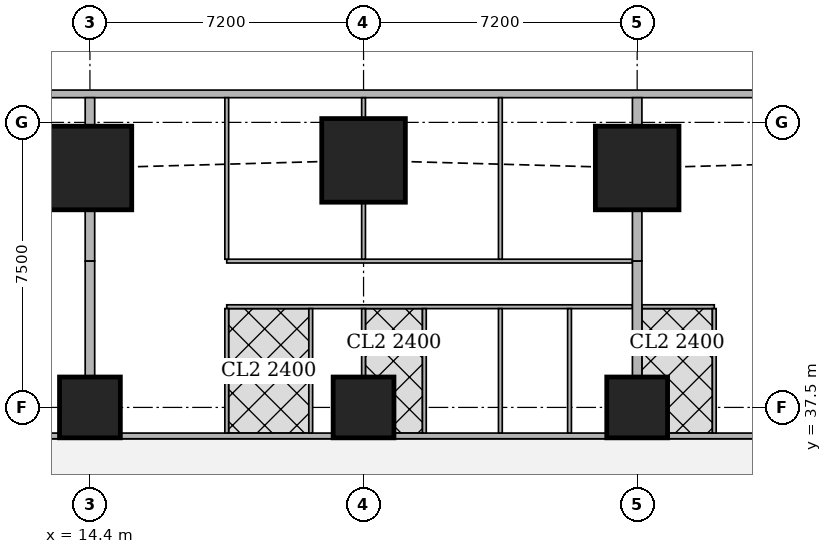
"""IFC4 building model, lengths in metres.
Left out: names, types, materials, properties, quantities, classifications, styles, units other than length and angle.
Written with IfcOpenShell. Run it as: python <this file> out.ifc"""

import sys

from ifc_helpers import new_model, si_unit, direction, frame, frame_2d, origin, origin_2d, place, context, subcontext, project, spatial, rectangle, extrude, element, fill, save


model = new_model("IFC4")
c1 = context("Model", 3, precision=1e-05, world=origin(), true_north=direction((0.0, 1.0)))
c2 = subcontext(c1, "Body", "Model", "MODEL_VIEW")
j1 = project(units=[si_unit("LENGTHUNIT", "METRE"), si_unit("PLANEANGLEUNIT", "RADIAN")], contexts=[c1])
p1 = place(None, origin())
s1 = spatial("IfcSite", under=j1, at=p1, CompositionType="ELEMENT")
p2 = place(p1, origin())
s2 = spatial("IfcBuilding", under=s1, at=p2, CompositionType="ELEMENT")
p3 = place(p2, frame((0.0, 0.0, 81.65)))
s3 = spatial("IfcBuildingStorey", under=s2, at=p3, CompositionType="ELEMENT", Elevation=81.65)
for number, where, z_axis, x_axis in (
    (1, (14.4, 37.5, 0.0), (0.0, 0.0, 1.0), (1.0, 0.0, 0.0)),
    (2, (21.6, 37.5, 0.0), (0.0, 0.0, 1.0), (1.0, 0.0, 0.0)),
    (3, (28.8, 37.5, 0.0), (0.0, 0.0, 1.0), (1.0, 0.0, 0.0)),
):
    element("IfcColumn", number, at=place(p3, frame(where, z_axis=z_axis, x_axis=x_axis)), inside=s3, PredefinedType="COLUMN", context=c2, shape_type="SweptSolid", body=[
        extrude(rectangle(XDim=1.6, YDim=1.6, at=origin_2d()), origin(), (0.0, 0.0, 1.0), 3.75),
    ])
for number, where, z_axis, x_axis in (
    (4, (14.4, 43.8, 0.0), (0.0, 0.0, 1.0), (1.0, 0.0, 0.0)),
    (5, (21.6, 44.0, 0.0), (0.0, 0.0, 1.0), (1.0, 0.0, 0.0)),
    (6, (28.8, 43.8, 0.0), (0.0, 0.0, 1.0), (1.0, 0.0, 0.0)),
):
    element("IfcColumn", number, at=place(p3, frame(where, z_axis=z_axis, x_axis=x_axis)), inside=s3, PredefinedType="COLUMN", context=c2, shape_type="SweptSolid", body=[
        extrude(rectangle(XDim=2.2, YDim=2.2, at=origin_2d()), origin(), (0.0, 0.0, 1.0), 3.75),
    ])
p4 = place(p3, frame((40.106, 45.75, 0.0), z_axis=(0.0, 0.0, 1.0), x_axis=(-1.0, 0.0, 0.0)))
e7 = element("IfcWall", 7, at=p4, inside=s3, PredefinedType="SOLIDWALL", context=c2, shape_type="SweptSolid", body=[
    extrude(rectangle(XDim=37.943, YDim=0.2, at=frame_2d((18.971, 0.0))), origin(), (0.0, 0.0, 1.0), 3.5),
])
p5 = place(p4, frame((8.606, 0.0, 0.9)))
e8 = element("IfcOpeningElement", 8, at=p5, cuts=e7, PredefinedType="OPENING", context=c2, shape_type="SweptSolid", body=[
    extrude(rectangle(XDim=1.8, YDim=1.5, at=frame_2d((0.9, 0.75))), frame((0.0, 0.11, 0.0), z_axis=(0.0, -1.0, 0.0), x_axis=(1.0, 0.0, 0.0)), (0.0, 0.0, 1.0), 0.22),
])
p6 = place(p4, frame((12.206, 0.0, 0.9)))
e9 = element("IfcOpeningElement", 9, at=p6, cuts=e7, PredefinedType="OPENING", context=c2, shape_type="SweptSolid", body=[
    extrude(rectangle(XDim=1.8, YDim=1.5, at=frame_2d((0.9, 0.75))), frame((0.0, 0.11, 0.0), z_axis=(0.0, -1.0, 0.0), x_axis=(1.0, 0.0, 0.0)), (0.0, 0.0, 1.0), 0.22),
])
p7 = place(p4, frame((15.806, 0.0, 0.9)))
e10 = element("IfcOpeningElement", 10, at=p7, cuts=e7, PredefinedType="OPENING", context=c2, shape_type="SweptSolid", body=[
    extrude(rectangle(XDim=1.8, YDim=1.5, at=frame_2d((0.9, 0.75))), frame((0.0, 0.11, 0.0), z_axis=(0.0, -1.0, 0.0), x_axis=(1.0, 0.0, 0.0)), (0.0, 0.0, 1.0), 0.22),
])
p8 = place(p4, frame((19.406, 0.0, 0.9)))
e11 = element("IfcOpeningElement", 11, at=p8, cuts=e7, PredefinedType="OPENING", context=c2, shape_type="SweptSolid", body=[
    extrude(rectangle(XDim=1.8, YDim=1.5, at=frame_2d((0.9, 0.75))), frame((0.0, 0.11, 0.0), z_axis=(0.0, -1.0, 0.0), x_axis=(1.0, 0.0, 0.0)), (0.0, 0.0, 1.0), 0.22),
])
p9 = place(p4, frame((23.006, 0.0, 0.9)))
e12 = element("IfcOpeningElement", 12, at=p9, cuts=e7, PredefinedType="OPENING", context=c2, shape_type="SweptSolid", body=[
    extrude(rectangle(XDim=1.8, YDim=1.5, at=frame_2d((0.9, 0.75))), frame((0.0, 0.11, 0.0), z_axis=(0.0, -1.0, 0.0), x_axis=(1.0, 0.0, 0.0)), (0.0, 0.0, 1.0), 0.22),
])
p10 = place(p4, frame((26.606, 0.0, 0.9)))
e13 = element("IfcOpeningElement", 13, at=p10, cuts=e7, PredefinedType="OPENING", context=c2, shape_type="SweptSolid", body=[
    extrude(rectangle(XDim=1.8, YDim=1.5, at=frame_2d((0.9, 0.75))), frame((0.0, 0.11, 0.0), z_axis=(0.0, -1.0, 0.0), x_axis=(1.0, 0.0, 0.0)), (0.0, 0.0, 1.0), 0.22),
])
p11 = place(p3, frame((8.1, 36.75, 0.0), z_axis=(0.0, 0.0, 1.0), x_axis=(1.0, 0.0, 0.0)))
e14 = element("IfcWall", 14, at=p11, inside=s3, PredefinedType="SOLIDWALL", context=c2, shape_type="SweptSolid", body=[
    extrude(rectangle(XDim=5.499, YDim=0.15, at=frame_2d((2.75, 0.0))), origin(), (0.0, 0.0, 1.0), 3.5),
])
p12 = place(p11, frame((3.739, 0.0, 0.0)))
e15 = element("IfcOpeningElement", 15, at=p12, cuts=e14, PredefinedType="OPENING", context=c2, shape_type="SweptSolid", body=[
    extrude(rectangle(XDim=1.0, YDim=2.1, at=frame_2d((0.5, 1.05))), frame((0.0, 0.085, 0.0), z_axis=(0.0, -1.0, 0.0), x_axis=(1.0, 0.0, 0.0)), (0.0, 0.0, 1.0), 0.17),
])
p13 = place(p3, frame((15.201, 36.75, 0.0), z_axis=(0.0, 0.0, 1.0), x_axis=(1.0, 0.0, 0.0)))
e16 = element("IfcWall", 16, at=p13, inside=s3, PredefinedType="SOLIDWALL", context=c2, shape_type="SweptSolid", body=[
    extrude(rectangle(XDim=5.598, YDim=0.15, at=frame_2d((2.799, 0.0))), origin(), (0.0, 0.0, 1.0), 3.5),
])
p14 = place(p13, frame((0.699, 0.0, 0.0)))
e17 = element("IfcOpeningElement", 17, at=p14, cuts=e16, PredefinedType="OPENING", context=c2, shape_type="SweptSolid", body=[
    extrude(rectangle(XDim=1.0, YDim=2.1, at=frame_2d((0.5, 1.05))), frame((0.0, 0.085, 0.0), z_axis=(0.0, -1.0, 0.0), x_axis=(1.0, 0.0, 0.0)), (0.0, 0.0, 1.0), 0.17),
])
p15 = place(p3, frame((22.401, 36.75, 0.0), z_axis=(0.0, 0.0, 1.0), x_axis=(1.0, 0.0, 0.0)))
e18 = element("IfcWall", 18, at=p15, inside=s3, PredefinedType="SOLIDWALL", context=c2, shape_type="SweptSolid", body=[
    extrude(rectangle(XDim=5.598, YDim=0.15, at=frame_2d((2.799, 0.0))), origin(), (0.0, 0.0, 1.0), 3.5),
])
p16 = place(p3, frame((29.601, 36.75, 0.0), z_axis=(0.0, 0.0, 1.0), x_axis=(1.0, 0.0, 0.0)))
e19 = element("IfcWall", 19, at=p16, inside=s3, PredefinedType="SOLIDWALL", context=c2, shape_type="SweptSolid", body=[
    extrude(rectangle(XDim=5.372, YDim=0.15, at=frame_2d((2.686, 0.0))), origin(), (0.0, 0.0, 1.0), 3.5),
])
p17 = place(p16, frame((2.845, 0.0, 0.0)))
e20 = element("IfcOpeningElement", 20, at=p17, cuts=e19, PredefinedType="OPENING", context=c2, shape_type="SweptSolid", body=[
    extrude(rectangle(XDim=1.0, YDim=2.1, at=frame_2d((0.5, 1.05))), frame((0.0, 0.085, 0.0), z_axis=(0.0, -1.0, 0.0), x_axis=(1.0, 0.0, 0.0)), (0.0, 0.0, 1.0), 0.17),
])
p18 = place(p3, frame((18.0, 41.35, 0.0), z_axis=(0.0, 0.0, 1.0), x_axis=(1.0, 0.0, 0.0)))
e21 = element("IfcWall", 21, at=p18, inside=s3, PredefinedType="PARTITIONING", context=c2, shape_type="SweptSolid", body=[
    extrude(rectangle(XDim=10.675, YDim=0.1, at=frame_2d((5.337, 0.0))), origin(), (0.0, 0.0, 1.0), 3.5),
])
p19 = place(p18, frame((0.2, 0.0, 0.0)))
e22 = element("IfcOpeningElement", 22, at=p19, cuts=e21, PredefinedType="OPENING", context=c2, shape_type="SweptSolid", body=[
    extrude(rectangle(XDim=0.9, YDim=2.1, at=frame_2d((0.45, 1.05))), frame((0.0, 0.06, 0.0), z_axis=(0.0, -1.0, 0.0), x_axis=(1.0, 0.0, 0.0)), (0.0, 0.0, 1.0), 0.12),
])
p20 = place(p18, frame((3.8, 0.0, 0.0)))
e23 = element("IfcOpeningElement", 23, at=p20, cuts=e21, PredefinedType="OPENING", context=c2, shape_type="SweptSolid", body=[
    extrude(rectangle(XDim=0.9, YDim=2.1, at=frame_2d((0.45, 1.05))), frame((0.0, 0.06, 0.0), z_axis=(0.0, -1.0, 0.0), x_axis=(1.0, 0.0, 0.0)), (0.0, 0.0, 1.0), 0.12),
])
p21 = place(p18, frame((7.4, 0.0, 0.0)))
e24 = element("IfcOpeningElement", 24, at=p21, cuts=e21, PredefinedType="OPENING", context=c2, shape_type="SweptSolid", body=[
    extrude(rectangle(XDim=0.9, YDim=2.1, at=frame_2d((0.45, 1.05))), frame((0.0, 0.06, 0.0), z_axis=(0.0, -1.0, 0.0), x_axis=(1.0, 0.0, 0.0)), (0.0, 0.0, 1.0), 0.12),
])
p22 = place(p3, frame((18.0, 40.15, 0.0), z_axis=(0.0, 0.0, 1.0), x_axis=(1.0, 0.0, 0.0)))
e25 = element("IfcWall", 25, at=p22, inside=s3, PredefinedType="PARTITIONING", context=c2, shape_type="SweptSolid", body=[
    extrude(rectangle(XDim=10.675, YDim=0.1, at=frame_2d((5.337, 0.0))), origin(), (0.0, 0.0, 1.0), 3.5),
])
p23 = place(p22, frame((0.655, 0.0, 0.0)))
e26 = element("IfcOpeningElement", 26, at=p23, cuts=e25, PredefinedType="OPENING", context=c2, shape_type="SweptSolid", body=[
    extrude(rectangle(XDim=0.9, YDim=2.1, at=frame_2d((0.45, 1.05))), frame((0.0, 0.06, 0.0), z_axis=(0.0, -1.0, 0.0), x_axis=(1.0, 0.0, 0.0)), (0.0, 0.0, 1.0), 0.12),
])
p24 = place(p22, frame((3.95, 0.0, 0.0)))
e27 = element("IfcOpeningElement", 27, at=p24, cuts=e25, PredefinedType="OPENING", context=c2, shape_type="SweptSolid", body=[
    extrude(rectangle(XDim=0.9, YDim=2.1, at=frame_2d((0.45, 1.05))), frame((0.0, 0.06, 0.0), z_axis=(0.0, -1.0, 0.0), x_axis=(1.0, 0.0, 0.0)), (0.0, 0.0, 1.0), 0.12),
])
p25 = place(p22, frame((7.66, 0.0, 0.0)))
e28 = element("IfcOpeningElement", 28, at=p25, cuts=e25, PredefinedType="OPENING", context=c2, shape_type="SweptSolid", body=[
    extrude(rectangle(XDim=0.9, YDim=2.1, at=frame_2d((0.45, 1.05))), frame((0.0, 0.06, 0.0), z_axis=(0.0, -1.0, 0.0), x_axis=(1.0, 0.0, 0.0)), (0.0, 0.0, 1.0), 0.12),
])
p26 = place(p22, frame((2.455, 0.0, 0.0)))
e29 = element("IfcOpeningElement", 29, at=p26, cuts=e25, PredefinedType="OPENING", context=c2, shape_type="SweptSolid", body=[
    extrude(rectangle(XDim=0.9, YDim=2.1, at=frame_2d((0.45, 1.05))), frame((0.0, 0.06, 0.0), z_axis=(0.0, -1.0, 0.0), x_axis=(1.0, 0.0, 0.0)), (0.0, 0.0, 1.0), 0.12),
])
p27 = place(p22, frame((5.75, 0.0, 0.0)))
e30 = element("IfcOpeningElement", 30, at=p27, cuts=e25, PredefinedType="OPENING", context=c2, shape_type="SweptSolid", body=[
    extrude(rectangle(XDim=0.9, YDim=2.1, at=frame_2d((0.45, 1.05))), frame((0.0, 0.06, 0.0), z_axis=(0.0, -1.0, 0.0), x_axis=(1.0, 0.0, 0.0)), (0.0, 0.0, 1.0), 0.12),
])
p28 = place(p22, frame((9.46, 0.0, 0.0)))
e31 = element("IfcOpeningElement", 31, at=p28, cuts=e25, PredefinedType="OPENING", context=c2, shape_type="SweptSolid", body=[
    extrude(rectangle(XDim=0.9, YDim=2.1, at=frame_2d((0.45, 1.05))), frame((0.0, 0.06, 0.0), z_axis=(0.0, -1.0, 0.0), x_axis=(1.0, 0.0, 0.0)), (0.0, 0.0, 1.0), 0.12),
])
p29 = place(p3, frame((18.0, 41.4, 0.0), z_axis=(0.0, 0.0, 1.0), x_axis=(0.0, 1.0, 0.0)))
e32 = element("IfcWall", 32, at=p29, inside=s3, PredefinedType="PARTITIONING", context=c2, shape_type="SweptSolid", body=[
    extrude(rectangle(XDim=4.25, YDim=0.1, at=frame_2d((2.125, 0.0))), origin(), (0.0, 0.0, 1.0), 2.2),
])
p30 = place(p3, frame((21.6, 41.4, 0.0), z_axis=(0.0, 0.0, 1.0), x_axis=(0.0, 1.0, 0.0)))
e33 = element("IfcWall", 33, at=p30, inside=s3, PredefinedType="PARTITIONING", context=c2, shape_type="SweptSolid", body=[
    extrude(rectangle(XDim=1.499, YDim=0.1, at=frame_2d((0.75, 0.0))), origin(), (0.0, 0.0, 1.0), 3.5),
])
p31 = place(p3, frame((21.6, 45.101, 0.0), z_axis=(0.0, 0.0, 1.0), x_axis=(0.0, 1.0, 0.0)))
e34 = element("IfcWall", 34, at=p31, inside=s3, PredefinedType="PARTITIONING", context=c2, shape_type="SweptSolid", body=[
    extrude(rectangle(XDim=0.549, YDim=0.1, at=frame_2d((0.274, 0.0))), origin(), (0.0, 0.0, 1.0), 3.5),
])
p32 = place(p3, frame((25.2, 41.4, 0.0), z_axis=(0.0, 0.0, 1.0), x_axis=(0.0, 1.0, 0.0)))
e35 = element("IfcWall", 35, at=p32, inside=s3, PredefinedType="PARTITIONING", context=c2, shape_type="SweptSolid", body=[
    extrude(rectangle(XDim=4.25, YDim=0.1, at=frame_2d((2.125, 0.0))), origin(), (0.0, 0.0, 1.0), 2.2),
])
p33 = place(p3, frame((18.0, 36.825, 0.0), z_axis=(0.0, 0.0, 1.0), x_axis=(0.0, 1.0, 0.0)))
e36 = element("IfcWall", 36, at=p33, inside=s3, PredefinedType="PARTITIONING", context=c2, shape_type="SweptSolid", body=[
    extrude(rectangle(XDim=3.275, YDim=0.1, at=frame_2d((1.638, 0.0))), origin(), (0.0, 0.0, 1.0), 3.5),
])
p34 = place(p3, frame((21.6, 38.301, 0.0), z_axis=(0.0, 0.0, 1.0), x_axis=(0.0, 1.0, 0.0)))
e37 = element("IfcWall", 37, at=p34, inside=s3, PredefinedType="PARTITIONING", context=c2, shape_type="SweptSolid", body=[
    extrude(rectangle(XDim=1.799, YDim=0.1, at=frame_2d((0.899, 0.0))), origin(), (0.0, 0.0, 1.0), 3.5),
])
for number, where, z_axis, x_axis in (
    (38, (25.2, 36.825, 0.0), (0.0, 0.0, 1.0), (0.0, 1.0, 0.0)),
    (39, (20.21, 36.825, 0.0), (0.0, 0.0, 1.0), (0.0, 1.0, 0.0)),
    (40, (23.2, 36.825, 0.0), (0.0, 0.0, 1.0), (0.0, 1.0, 0.0)),
    (41, (27.02, 36.825, 0.0), (0.0, 0.0, 1.0), (0.0, 1.0, 0.0)),
):
    element("IfcWall", number, at=place(p3, frame(where, z_axis=z_axis, x_axis=x_axis)), inside=s3, PredefinedType="PARTITIONING", context=c2, shape_type="SweptSolid", body=[
        extrude(rectangle(XDim=3.275, YDim=0.1, at=frame_2d((1.638, 0.0))), origin(), (0.0, 0.0, 1.0), 3.5),
    ])
p35 = place(p3, frame((14.4, 41.35, 0.0), z_axis=(0.0, 0.0, 1.0), x_axis=(0.0, 1.0, 0.0)))
e42 = element("IfcWall", 42, at=p35, inside=s3, PredefinedType="SOLIDWALL", context=c2, shape_type="SweptSolid", body=[
    extrude(rectangle(XDim=1.349, YDim=0.25, at=frame_2d((0.674, 0.0))), origin(), (0.0, 0.0, 1.0), 3.5),
])
p36 = place(p3, frame((14.4, 44.901, 0.0), z_axis=(0.0, 0.0, 1.0), x_axis=(0.0, 1.0, 0.0)))
e43 = element("IfcWall", 43, at=p36, inside=s3, PredefinedType="SOLIDWALL", context=c2, shape_type="SweptSolid", body=[
    extrude(rectangle(XDim=0.749, YDim=0.25, at=frame_2d((0.375, 0.0))), origin(), (0.0, 0.0, 1.0), 3.5),
])
p37 = place(p3, frame((14.4, 38.301, 0.0), z_axis=(0.0, 0.0, 1.0), x_axis=(0.0, 1.0, 0.0)))
e44 = element("IfcWall", 44, at=p37, inside=s3, PredefinedType="SOLIDWALL", context=c2, shape_type="SweptSolid", body=[
    extrude(rectangle(XDim=3.049, YDim=0.25, at=frame_2d((1.524, 0.0))), origin(), (0.0, 0.0, 1.0), 3.5),
])
p38 = place(p3, frame((28.925, 40.15, 0.0), z_axis=(0.0, 0.0, 1.0), x_axis=(1.0, 0.0, 0.0)))
e45 = element("IfcWall", 45, at=p38, inside=s3, PredefinedType="PARTITIONING", context=c2, shape_type="SweptSolid", body=[
    extrude(rectangle(XDim=1.904, YDim=0.1, at=frame_2d((0.952, 0.0))), origin(), (0.0, 0.0, 1.0), 3.5),
])
p39 = place(p38, frame((0.425, 0.0, 0.0)))
e46 = element("IfcOpeningElement", 46, at=p39, cuts=e45, PredefinedType="OPENING", context=c2, shape_type="SweptSolid", body=[
    extrude(rectangle(XDim=0.9, YDim=2.1, at=frame_2d((0.45, 1.05))), frame((0.0, 0.06, 0.0), z_axis=(0.0, -1.0, 0.0), x_axis=(1.0, 0.0, 0.0)), (0.0, 0.0, 1.0), 0.12),
])
p40 = place(p3, frame((30.829, 36.825, 0.0), z_axis=(0.0, 0.0, 1.0), x_axis=(0.0, 1.0, 0.0)))
e47 = element("IfcWall", 47, at=p40, inside=s3, PredefinedType="PARTITIONING", context=c2, shape_type="SweptSolid", body=[
    extrude(rectangle(XDim=3.275, YDim=0.1, at=frame_2d((1.638, 0.0))), origin(), (0.0, 0.0, 1.0), 3.5),
])
p41 = place(p3, frame((28.8, 41.35, 0.0), z_axis=(0.0, 0.0, 1.0), x_axis=(0.0, 1.0, 0.0)))
e48 = element("IfcWall", 48, at=p41, inside=s3, PredefinedType="SOLIDWALL", context=c2, shape_type="SweptSolid", body=[
    extrude(rectangle(XDim=1.349, YDim=0.25, at=frame_2d((0.674, 0.0))), origin(), (0.0, 0.0, 1.0), 3.5),
])
p42 = place(p3, frame((28.8, 44.901, 0.0), z_axis=(0.0, 0.0, 1.0), x_axis=(0.0, 1.0, 0.0)))
e49 = element("IfcWall", 49, at=p42, inside=s3, PredefinedType="SOLIDWALL", context=c2, shape_type="SweptSolid", body=[
    extrude(rectangle(XDim=0.749, YDim=0.25, at=frame_2d((0.375, 0.0))), origin(), (0.0, 0.0, 1.0), 3.5),
])
p43 = place(p3, frame((28.8, 38.301, 0.0), z_axis=(0.0, 0.0, 1.0), x_axis=(0.0, 1.0, 0.0)))
e50 = element("IfcWall", 50, at=p43, inside=s3, PredefinedType="SOLIDWALL", context=c2, shape_type="SweptSolid", body=[
    extrude(rectangle(XDim=3.049, YDim=0.25, at=frame_2d((1.524, 0.0))), origin(), (0.0, 0.0, 1.0), 3.5),
])
p44 = place(p5, origin())
e51 = element("IfcWindow", 51, at=p44, inside=s3, PartitioningType="SINGLE_PANEL", PredefinedType="WINDOW", context=c2, shape_type="SweptSolid", body=[
    extrude(rectangle(XDim=1.8, YDim=1.5, at=frame_2d((0.9, 0.75))), frame((0.0, 0.03, 0.0), z_axis=(0.0, -1.0, 0.0), x_axis=(1.0, 0.0, 0.0)), (0.0, 0.0, 1.0), 0.06),
])
fill(e8, e51)
p45 = place(p6, origin())
e52 = element("IfcWindow", 52, at=p45, inside=s3, PartitioningType="SINGLE_PANEL", PredefinedType="WINDOW", context=c2, shape_type="SweptSolid", body=[
    extrude(rectangle(XDim=1.8, YDim=1.5, at=frame_2d((0.9, 0.75))), frame((0.0, 0.03, 0.0), z_axis=(0.0, -1.0, 0.0), x_axis=(1.0, 0.0, 0.0)), (0.0, 0.0, 1.0), 0.06),
])
fill(e9, e52)
p46 = place(p7, origin())
e53 = element("IfcWindow", 53, at=p46, inside=s3, PartitioningType="SINGLE_PANEL", PredefinedType="WINDOW", context=c2, shape_type="SweptSolid", body=[
    extrude(rectangle(XDim=1.8, YDim=1.5, at=frame_2d((0.9, 0.75))), frame((0.0, 0.03, 0.0), z_axis=(0.0, -1.0, 0.0), x_axis=(1.0, 0.0, 0.0)), (0.0, 0.0, 1.0), 0.06),
])
fill(e10, e53)
p47 = place(p8, origin())
e54 = element("IfcWindow", 54, at=p47, inside=s3, PartitioningType="SINGLE_PANEL", PredefinedType="WINDOW", context=c2, shape_type="SweptSolid", body=[
    extrude(rectangle(XDim=1.8, YDim=1.5, at=frame_2d((0.9, 0.75))), frame((0.0, 0.03, 0.0), z_axis=(0.0, -1.0, 0.0), x_axis=(1.0, 0.0, 0.0)), (0.0, 0.0, 1.0), 0.06),
])
fill(e11, e54)
p48 = place(p9, origin())
e55 = element("IfcWindow", 55, at=p48, inside=s3, PartitioningType="SINGLE_PANEL", PredefinedType="WINDOW", context=c2, shape_type="SweptSolid", body=[
    extrude(rectangle(XDim=1.8, YDim=1.5, at=frame_2d((0.9, 0.75))), frame((0.0, 0.03, 0.0), z_axis=(0.0, -1.0, 0.0), x_axis=(1.0, 0.0, 0.0)), (0.0, 0.0, 1.0), 0.06),
])
fill(e12, e55)
p49 = place(p10, origin())
e56 = element("IfcWindow", 56, at=p49, inside=s3, PartitioningType="SINGLE_PANEL", PredefinedType="WINDOW", context=c2, shape_type="SweptSolid", body=[
    extrude(rectangle(XDim=1.8, YDim=1.5, at=frame_2d((0.9, 0.75))), frame((0.0, 0.03, 0.0), z_axis=(0.0, -1.0, 0.0), x_axis=(1.0, 0.0, 0.0)), (0.0, 0.0, 1.0), 0.06),
])
fill(e13, e56)
p50 = place(p19, origin())
e57 = element("IfcDoor", 57, at=p50, inside=s3, OperationType="SINGLE_SWING_LEFT", PredefinedType="DOOR", context=c2, shape_type="SweptSolid", body=[
    extrude(rectangle(XDim=0.9, YDim=2.1, at=frame_2d((0.45, 1.05))), frame((0.0, 0.025, 0.0), z_axis=(0.0, -1.0, 0.0), x_axis=(1.0, 0.0, 0.0)), (0.0, 0.0, 1.0), 0.05),
])
fill(e22, e57)
p51 = place(p20, origin())
e58 = element("IfcDoor", 58, at=p51, inside=s3, OperationType="SINGLE_SWING_LEFT", PredefinedType="DOOR", context=c2, shape_type="SweptSolid", body=[
    extrude(rectangle(XDim=0.9, YDim=2.1, at=frame_2d((0.45, 1.05))), frame((0.0, 0.025, 0.0), z_axis=(0.0, -1.0, 0.0), x_axis=(1.0, 0.0, 0.0)), (0.0, 0.0, 1.0), 0.05),
])
fill(e23, e58)
p52 = place(p21, origin())
e59 = element("IfcDoor", 59, at=p52, inside=s3, OperationType="SINGLE_SWING_LEFT", PredefinedType="DOOR", context=c2, shape_type="SweptSolid", body=[
    extrude(rectangle(XDim=0.9, YDim=2.1, at=frame_2d((0.45, 1.05))), frame((0.0, 0.025, 0.0), z_axis=(0.0, -1.0, 0.0), x_axis=(1.0, 0.0, 0.0)), (0.0, 0.0, 1.0), 0.05),
])
fill(e24, e59)
p53 = place(p23, origin())
e60 = element("IfcDoor", 60, at=p53, inside=s3, OperationType="SINGLE_SWING_RIGHT", PredefinedType="DOOR", context=c2, shape_type="SweptSolid", body=[
    extrude(rectangle(XDim=0.9, YDim=2.1, at=frame_2d((0.45, 1.05))), frame((0.0, 0.025, 0.0), z_axis=(0.0, -1.0, 0.0), x_axis=(1.0, 0.0, 0.0)), (0.0, 0.0, 1.0), 0.05),
])
fill(e26, e60)
p54 = place(p24, origin())
e61 = element("IfcDoor", 61, at=p54, inside=s3, OperationType="SINGLE_SWING_RIGHT", PredefinedType="DOOR", context=c2, shape_type="SweptSolid", body=[
    extrude(rectangle(XDim=0.9, YDim=2.1, at=frame_2d((0.45, 1.05))), frame((0.0, 0.025, 0.0), z_axis=(0.0, -1.0, 0.0), x_axis=(1.0, 0.0, 0.0)), (0.0, 0.0, 1.0), 0.05),
])
fill(e27, e61)
p55 = place(p25, origin())
e62 = element("IfcDoor", 62, at=p55, inside=s3, OperationType="SINGLE_SWING_RIGHT", PredefinedType="DOOR", context=c2, shape_type="SweptSolid", body=[
    extrude(rectangle(XDim=0.9, YDim=2.1, at=frame_2d((0.45, 1.05))), frame((0.0, 0.025, 0.0), z_axis=(0.0, -1.0, 0.0), x_axis=(1.0, 0.0, 0.0)), (0.0, 0.0, 1.0), 0.05),
])
fill(e28, e62)
p56 = place(p26, origin())
e63 = element("IfcDoor", 63, at=p56, inside=s3, OperationType="SINGLE_SWING_LEFT", PredefinedType="DOOR", context=c2, shape_type="SweptSolid", body=[
    extrude(rectangle(XDim=0.9, YDim=2.1, at=frame_2d((0.45, 1.05))), frame((0.0, 0.025, 0.0), z_axis=(0.0, -1.0, 0.0), x_axis=(1.0, 0.0, 0.0)), (0.0, 0.0, 1.0), 0.05),
])
fill(e29, e63)
p57 = place(p27, origin())
e64 = element("IfcDoor", 64, at=p57, inside=s3, OperationType="SINGLE_SWING_LEFT", PredefinedType="DOOR", context=c2, shape_type="SweptSolid", body=[
    extrude(rectangle(XDim=0.9, YDim=2.1, at=frame_2d((0.45, 1.05))), frame((0.0, 0.025, 0.0), z_axis=(0.0, -1.0, 0.0), x_axis=(1.0, 0.0, 0.0)), (0.0, 0.0, 1.0), 0.05),
])
fill(e30, e64)
p58 = place(p28, origin())
e65 = element("IfcDoor", 65, at=p58, inside=s3, OperationType="SINGLE_SWING_LEFT", PredefinedType="DOOR", context=c2, shape_type="SweptSolid", body=[
    extrude(rectangle(XDim=0.9, YDim=2.1, at=frame_2d((0.45, 1.05))), frame((0.0, 0.025, 0.0), z_axis=(0.0, -1.0, 0.0), x_axis=(1.0, 0.0, 0.0)), (0.0, 0.0, 1.0), 0.05),
])
fill(e31, e65)
p59 = place(p14, origin())
e66 = element("IfcDoor", 66, at=p59, inside=s3, OperationType="SINGLE_SWING_LEFT", PredefinedType="DOOR", context=c2, shape_type="SweptSolid", body=[
    extrude(rectangle(XDim=1.0, YDim=2.1, at=frame_2d((0.5, 1.05))), frame((0.0, 0.025, 0.0), z_axis=(0.0, -1.0, 0.0), x_axis=(1.0, 0.0, 0.0)), (0.0, 0.0, 1.0), 0.05),
])
fill(e17, e66)
p60 = place(p39, origin())
e67 = element("IfcDoor", 67, at=p60, inside=s3, OperationType="SINGLE_SWING_RIGHT", PredefinedType="DOOR", context=c2, shape_type="SweptSolid", body=[
    extrude(rectangle(XDim=0.9, YDim=2.1, at=frame_2d((0.45, 1.05))), frame((0.0, 0.025, 0.0), z_axis=(0.0, -1.0, 0.0), x_axis=(1.0, 0.0, 0.0)), (0.0, 0.0, 1.0), 0.05),
])
fill(e46, e67)
save(model, sys.argv[1])
